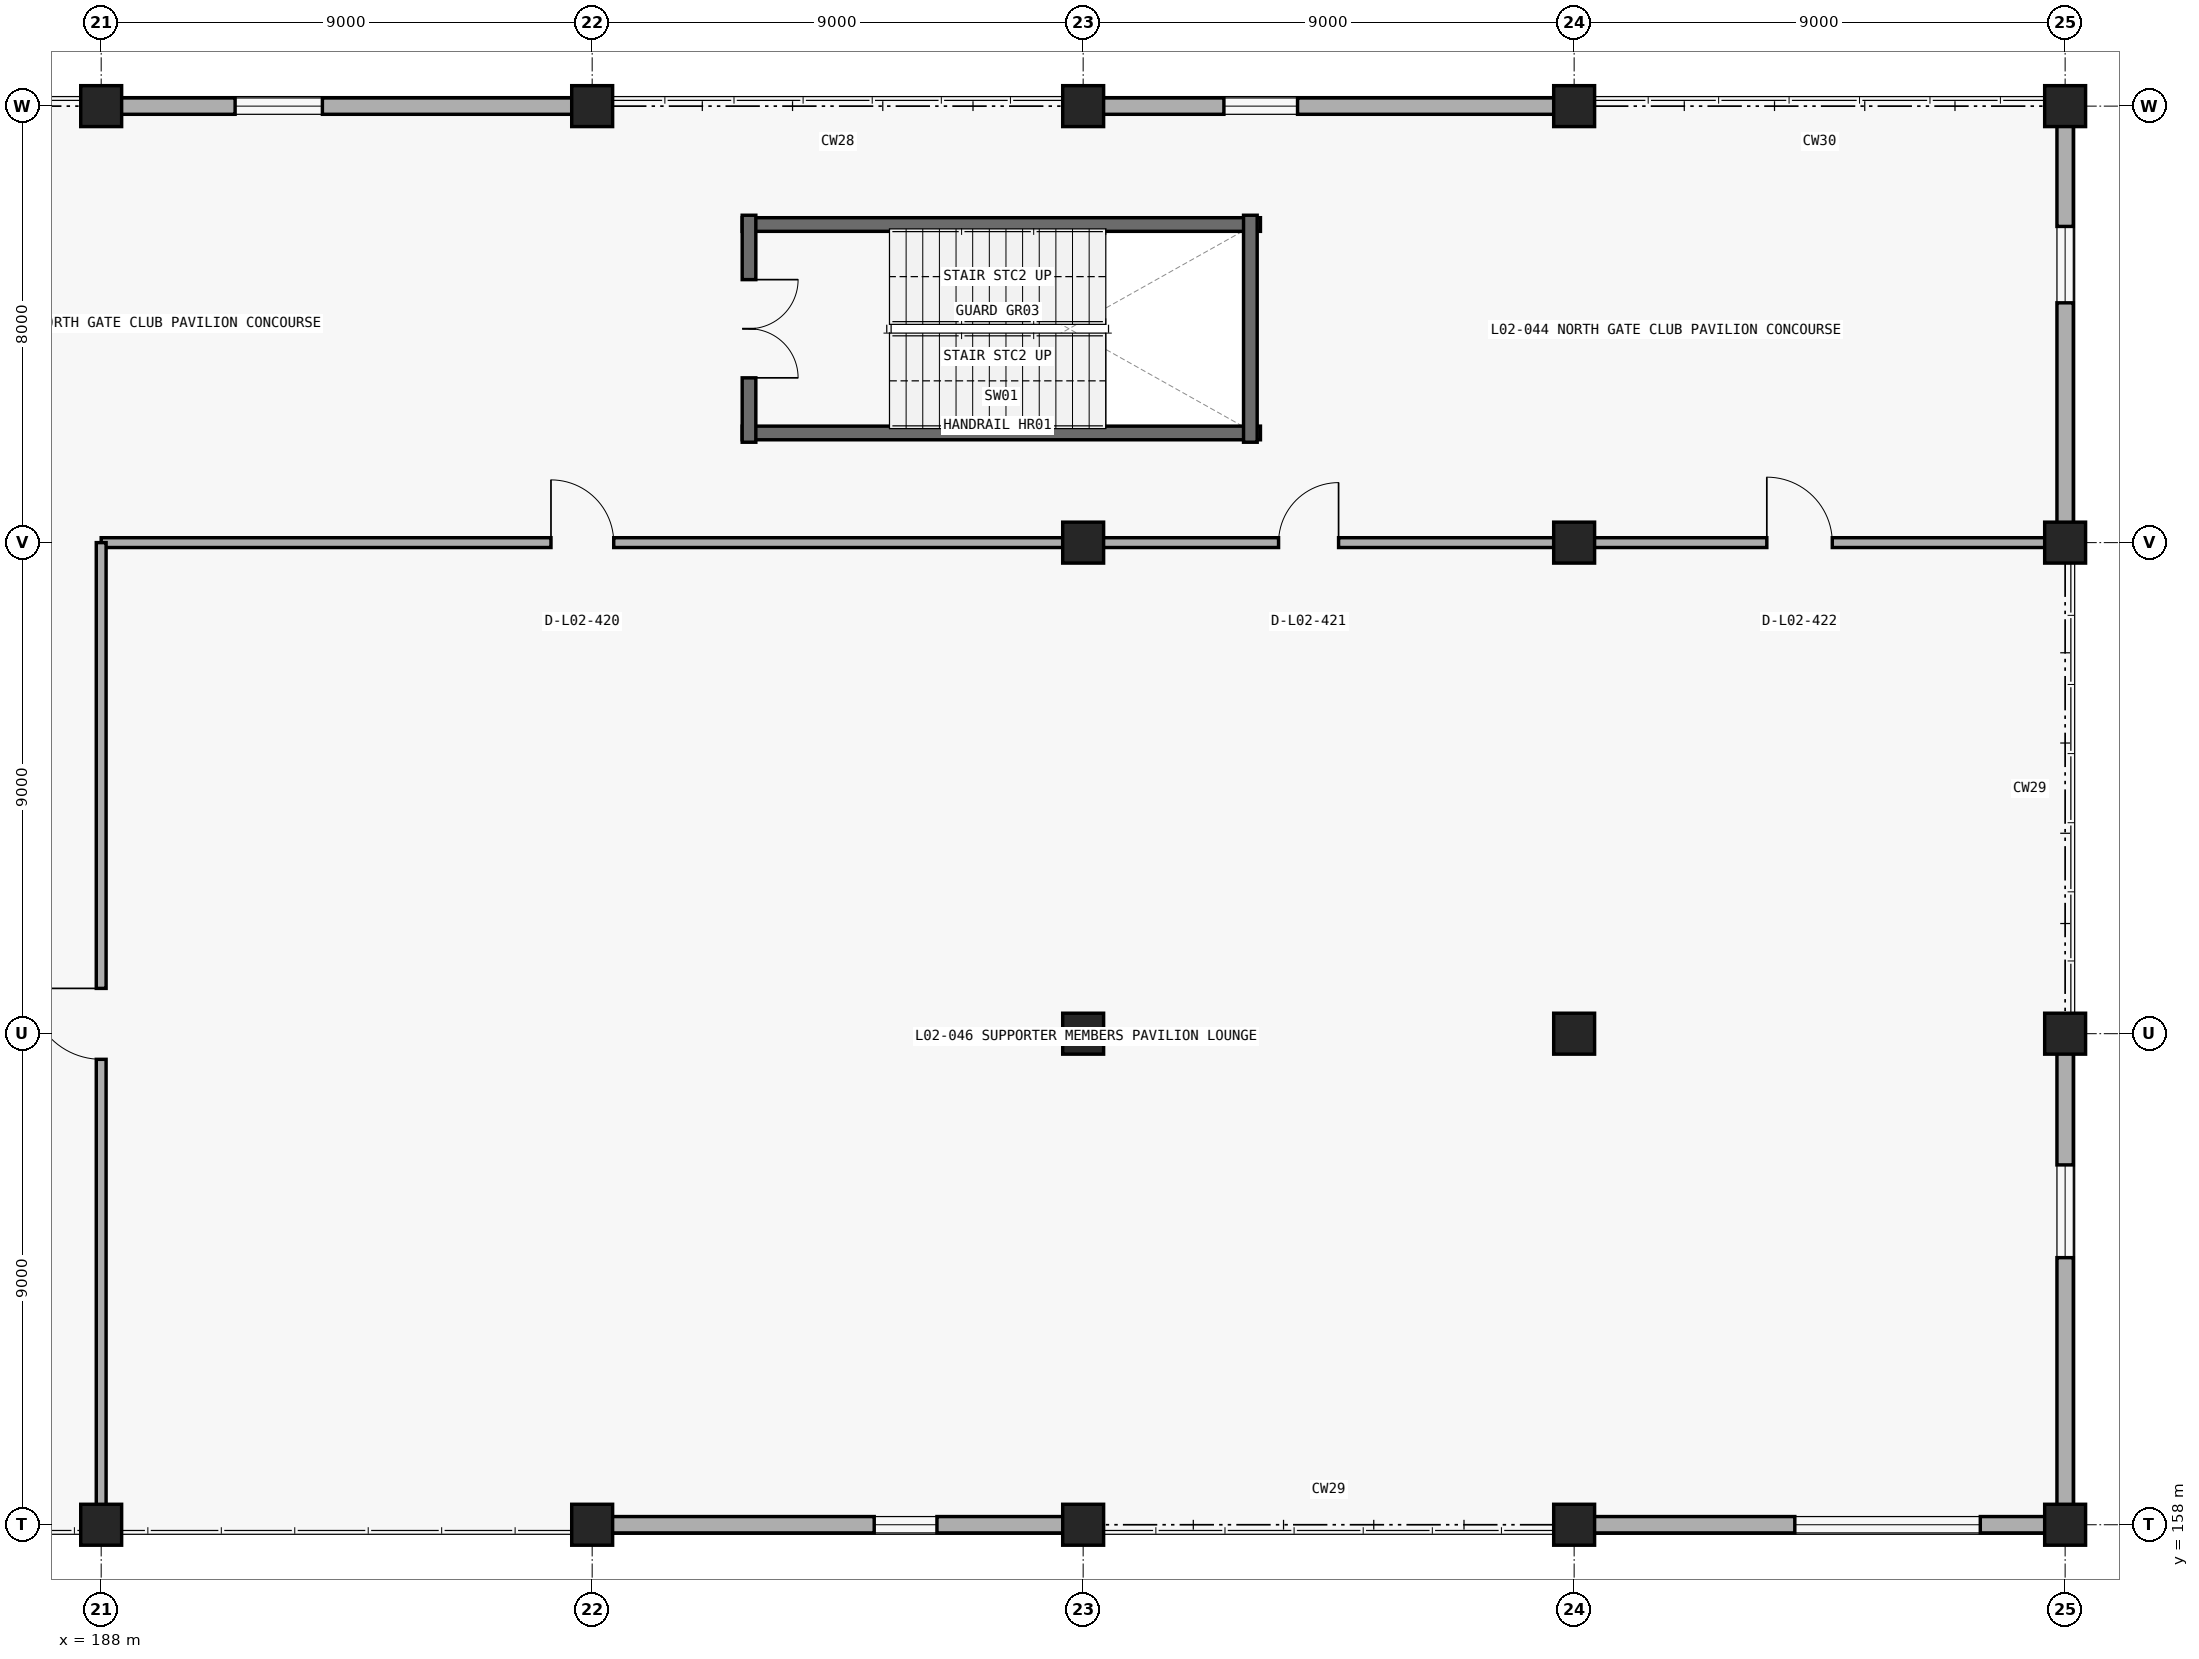
"""IFC4 building model, lengths in metres.
Left out: names, types, materials, properties, quantities, classifications, styles, units other than length and angle.
Written with IfcOpenShell. Run it as: python <this file> out.ifc"""

import sys

from ifc_helpers import new_model, si_unit, direction, frame, frame_2d, origin, origin_2d, place, context, subcontext, project, spatial, rectangle, extrude, element, fill, save


model = new_model("IFC4")
c1 = context("Model", 3, precision=1e-05, world=origin(), true_north=direction((0.0, 1.0)))
c2 = subcontext(c1, "Body", "Model", "MODEL_VIEW")
j1 = project(units=[si_unit("LENGTHUNIT", "METRE"), si_unit("PLANEANGLEUNIT", "RADIAN")], contexts=[c1])
p1 = place(None, origin())
s1 = spatial("IfcSite", under=j1, at=p1, CompositionType="ELEMENT")
p2 = place(p1, origin())
s2 = spatial("IfcBuilding", under=s1, at=p2, CompositionType="ELEMENT")
p3 = place(p2, frame((0.0, 0.0, 10.2)))
s3 = spatial("IfcBuildingStorey", under=s2, at=p3, CompositionType="ELEMENT", Elevation=10.2)
for number, where, z_axis, x_axis in (
    (1, (188.0, 158.0, 0.0), (0.0, 0.0, 1.0), (1.0, 0.0, 0.0)),
    (2, (188.0, 184.0, 0.0), (0.0, 0.0, 1.0), (1.0, 0.0, 0.0)),
    (3, (197.0, 158.0, 0.0), (0.0, 0.0, 1.0), (1.0, 0.0, 0.0)),
    (4, (197.0, 184.0, 0.0), (0.0, 0.0, 1.0), (1.0, 0.0, 0.0)),
    (5, (206.0, 158.0, 0.0), (0.0, 0.0, 1.0), (1.0, 0.0, 0.0)),
    (6, (206.0, 167.0, 0.0), (0.0, 0.0, 1.0), (1.0, 0.0, 0.0)),
    (7, (206.0, 176.0, 0.0), (0.0, 0.0, 1.0), (1.0, 0.0, 0.0)),
    (8, (206.0, 184.0, 0.0), (0.0, 0.0, 1.0), (1.0, 0.0, 0.0)),
    (9, (215.0, 158.0, 0.0), (0.0, 0.0, 1.0), (1.0, 0.0, 0.0)),
    (10, (215.0, 167.0, 0.0), (0.0, 0.0, 1.0), (1.0, 0.0, 0.0)),
    (11, (215.0, 176.0, 0.0), (0.0, 0.0, 1.0), (1.0, 0.0, 0.0)),
    (12, (215.0, 184.0, 0.0), (0.0, 0.0, 1.0), (1.0, 0.0, 0.0)),
    (13, (224.0, 158.0, 0.0), (0.0, 0.0, 1.0), (1.0, 0.0, 0.0)),
    (14, (224.0, 167.0, 0.0), (0.0, 0.0, 1.0), (1.0, 0.0, 0.0)),
    (15, (224.0, 176.0, 0.0), (0.0, 0.0, 1.0), (1.0, 0.0, 0.0)),
    (16, (224.0, 184.0, 0.0), (0.0, 0.0, 1.0), (1.0, 0.0, 0.0)),
):
    element("IfcColumn", number, at=place(p3, frame(where, z_axis=z_axis, x_axis=x_axis)), inside=s3, PredefinedType="COLUMN", context=c2, shape_type="SweptSolid", body=[
        extrude(rectangle(XDim=0.75, YDim=0.75, at=origin_2d()), origin(), (0.0, 0.0, 1.0), 4.8),
    ])
p4 = place(p3, frame((188.35, 184.0, 0.0), z_axis=(0.0, 0.0, 1.0), x_axis=(1.0, 0.0, 0.0)))
e17 = element("IfcWall", 17, at=p4, inside=s3, PredefinedType="STANDARD", context=c2, shape_type="SweptSolid", body=[
    extrude(rectangle(XDim=8.3, YDim=0.3, at=frame_2d((4.15, 0.0))), origin(), (0.0, 0.0, 1.0), 3.855),
])
p5 = place(p4, frame((2.105, 0.0, 0.95)))
e18 = element("IfcOpeningElement", 18, at=p5, cuts=e17, PredefinedType="OPENING", context=c2, shape_type="SweptSolid", body=[
    extrude(rectangle(XDim=1.6, YDim=1.6, at=frame_2d((0.8, 0.8))), frame((0.0, 0.16, 0.0), z_axis=(0.0, -1.0, 0.0), x_axis=(1.0, 0.0, 0.0)), (0.0, 0.0, 1.0), 0.32),
])
p6 = place(p3, frame((206.35, 184.0, 0.0), z_axis=(0.0, 0.0, 1.0), x_axis=(1.0, 0.0, 0.0)))
e19 = element("IfcWall", 19, at=p6, inside=s3, PredefinedType="STANDARD", context=c2, shape_type="SweptSolid", body=[
    extrude(rectangle(XDim=8.3, YDim=0.3, at=frame_2d((4.15, 0.0))), origin(), (0.0, 0.0, 1.0), 3.855),
])
p7 = place(p6, frame((2.23, 0.0, 0.95)))
e20 = element("IfcOpeningElement", 20, at=p7, cuts=e19, PredefinedType="OPENING", context=c2, shape_type="SweptSolid", body=[
    extrude(rectangle(XDim=1.35, YDim=1.9, at=frame_2d((0.675, 0.95))), frame((0.0, 0.16, 0.0), z_axis=(0.0, -1.0, 0.0), x_axis=(1.0, 0.0, 0.0)), (0.0, 0.0, 1.0), 0.32),
])
p8 = place(p3, frame((224.0, 183.65, 0.0), z_axis=(0.0, 0.0, 1.0), x_axis=(0.0, -1.0, 0.0)))
e21 = element("IfcWall", 21, at=p8, inside=s3, PredefinedType="STANDARD", context=c2, shape_type="SweptSolid", body=[
    extrude(rectangle(XDim=7.3, YDim=0.3, at=frame_2d((3.65, 0.0))), origin(), (0.0, 0.0, 1.0), 3.817),
])
p9 = place(p8, frame((1.855, 0.0, 0.95)))
e22 = element("IfcOpeningElement", 22, at=p9, cuts=e21, PredefinedType="OPENING", context=c2, shape_type="SweptSolid", body=[
    extrude(rectangle(XDim=1.4, YDim=1.5, at=frame_2d((0.7, 0.75))), frame((0.0, 0.16, 0.0), z_axis=(0.0, -1.0, 0.0), x_axis=(1.0, 0.0, 0.0)), (0.0, 0.0, 1.0), 0.32),
])
p10 = place(p3, frame((224.0, 166.65, 0.0), z_axis=(0.0, 0.0, 1.0), x_axis=(0.0, -1.0, 0.0)))
e23 = element("IfcWall", 23, at=p10, inside=s3, PredefinedType="STANDARD", context=c2, shape_type="SweptSolid", body=[
    extrude(rectangle(XDim=8.3, YDim=0.3, at=frame_2d((4.15, 0.0))), origin(), (0.0, 0.0, 1.0), 3.817),
])
p11 = place(p10, frame((2.055, 0.0, 0.95)))
e24 = element("IfcOpeningElement", 24, at=p11, cuts=e23, PredefinedType="OPENING", context=c2, shape_type="SweptSolid", body=[
    extrude(rectangle(XDim=1.7, YDim=1.75, at=frame_2d((0.85, 0.875))), frame((0.0, 0.16, 0.0), z_axis=(0.0, -1.0, 0.0), x_axis=(1.0, 0.0, 0.0)), (0.0, 0.0, 1.0), 0.32),
])
p12 = place(p3, frame((223.65, 158.0, 0.0), z_axis=(0.0, 0.0, 1.0), x_axis=(-1.0, 0.0, 0.0)))
e25 = element("IfcWall", 25, at=p12, inside=s3, PredefinedType="STANDARD", context=c2, shape_type="SweptSolid", body=[
    extrude(rectangle(XDim=8.3, YDim=0.3, at=frame_2d((4.15, 0.0))), origin(), (0.0, 0.0, 1.0), 3.855),
])
p13 = place(p12, frame((1.205, 0.0, 0.95)))
e26 = element("IfcOpeningElement", 26, at=p13, cuts=e25, PredefinedType="OPENING", context=c2, shape_type="SweptSolid", body=[
    extrude(rectangle(XDim=3.4, YDim=2.25, at=frame_2d((1.7, 1.125))), frame((0.0, 0.16, 0.0), z_axis=(0.0, -1.0, 0.0), x_axis=(1.0, 0.0, 0.0)), (0.0, 0.0, 1.0), 0.32),
])
p14 = place(p3, frame((205.65, 158.0, 0.0), z_axis=(0.0, 0.0, 1.0), x_axis=(-1.0, 0.0, 0.0)))
e27 = element("IfcWall", 27, at=p14, inside=s3, PredefinedType="STANDARD", context=c2, shape_type="SweptSolid", body=[
    extrude(rectangle(XDim=8.3, YDim=0.3, at=frame_2d((4.15, 0.0))), origin(), (0.0, 0.0, 1.0), 3.855),
])
p15 = place(p14, frame((2.33, 0.0, 0.95)))
e28 = element("IfcOpeningElement", 28, at=p15, cuts=e27, PredefinedType="OPENING", context=c2, shape_type="SweptSolid", body=[
    extrude(rectangle(XDim=1.15, YDim=1.7, at=frame_2d((0.575, 0.85))), frame((0.0, 0.16, 0.0), z_axis=(0.0, -1.0, 0.0), x_axis=(1.0, 0.0, 0.0)), (0.0, 0.0, 1.0), 0.32),
])
for number, where, z_axis, x_axis in (
    (29, (199.75, 178.01, 0.0), (0.0, 0.0, 1.0), (1.0, 0.0, 0.0)),
    (30, (209.25, 181.83, 0.0), (0.0, 0.0, 1.0), (-1.0, 0.0, 0.0)),
):
    element("IfcWall", number, at=place(p3, frame(where, z_axis=z_axis, x_axis=x_axis)), inside=s3, PredefinedType="SHEAR", context=c2, shape_type="SweptSolid", body=[
        extrude(rectangle(XDim=9.5, YDim=0.25, at=frame_2d((4.75, 0.0))), origin(), (0.0, 0.0, 1.0), 4.5),
    ])
p16 = place(p3, frame((199.875, 182.0, 0.0), z_axis=(0.0, 0.0, 1.0), x_axis=(0.0, -1.0, 0.0)))
e31 = element("IfcWall", 31, at=p16, inside=s3, PredefinedType="SHEAR", context=c2, shape_type="SweptSolid", body=[
    extrude(rectangle(XDim=4.16, YDim=0.25, at=frame_2d((2.08, 0.0))), origin(), (0.0, 0.0, 1.0), 4.5),
])
p17 = place(p16, frame((1.18, 0.0, 0.0)))
e32 = element("IfcOpeningElement", 32, at=p17, cuts=e31, PredefinedType="OPENING", context=c2, shape_type="SweptSolid", body=[
    extrude(rectangle(XDim=1.8, YDim=2.25, at=frame_2d((0.9, 1.125))), frame((0.0, 0.135, 0.0), z_axis=(0.0, -1.0, 0.0), x_axis=(1.0, 0.0, 0.0)), (0.0, 0.0, 1.0), 0.27),
])
p18 = place(p3, frame((209.065, 177.84, 0.0), z_axis=(0.0, 0.0, 1.0), x_axis=(0.0, 1.0, 0.0)))
e33 = element("IfcWall", 33, at=p18, inside=s3, PredefinedType="SHEAR", context=c2, shape_type="SweptSolid", body=[
    extrude(rectangle(XDim=4.16, YDim=0.25, at=frame_2d((2.08, 0.0))), origin(), (0.0, 0.0, 1.0), 4.5),
])
p19 = place(p3, frame((188.0, 176.0, 0.0), z_axis=(0.0, 0.0, 1.0), x_axis=(1.0, 0.0, 0.0)))
e34 = element("IfcWall", 34, at=p19, inside=s3, PredefinedType="PARTITIONING", context=c2, shape_type="SweptSolid", body=[
    extrude(rectangle(XDim=17.64, YDim=0.18, at=frame_2d((8.82, 0.0))), origin(), (0.0, 0.0, 1.0), 4.48),
])
p20 = place(p19, frame((8.245, 0.0, 0.0)))
e35 = element("IfcOpeningElement", 35, at=p20, cuts=e34, PredefinedType="OPENING", context=c2, shape_type="SweptSolid", body=[
    extrude(rectangle(XDim=1.15, YDim=2.2, at=frame_2d((0.575, 1.1))), frame((0.0, 0.1, 0.0), z_axis=(0.0, -1.0, 0.0), x_axis=(1.0, 0.0, 0.0)), (0.0, 0.0, 1.0), 0.2),
])
p21 = place(p3, frame((205.625, 176.0, 0.0), z_axis=(0.0, 0.0, 1.0), x_axis=(1.0, 0.0, 0.0)))
e36 = element("IfcWall", 36, at=p21, inside=s3, PredefinedType="PARTITIONING", context=c2, shape_type="SweptSolid", body=[
    extrude(rectangle(XDim=9.015, YDim=0.18, at=frame_2d((4.507, 0.0))), origin(), (0.0, 0.0, 1.0), 3.855),
])
p22 = place(p21, frame((3.957, 0.0, 0.0)))
e37 = element("IfcOpeningElement", 37, at=p22, cuts=e36, PredefinedType="OPENING", context=c2, shape_type="SweptSolid", body=[
    extrude(rectangle(XDim=1.1, YDim=2.15, at=frame_2d((0.55, 1.075))), frame((0.0, 0.1, 0.0), z_axis=(0.0, -1.0, 0.0), x_axis=(1.0, 0.0, 0.0)), (0.0, 0.0, 1.0), 0.2),
])
p23 = place(p3, frame((214.625, 176.0, 0.0), z_axis=(0.0, 0.0, 1.0), x_axis=(1.0, 0.0, 0.0)))
e38 = element("IfcWall", 38, at=p23, inside=s3, PredefinedType="PARTITIONING", context=c2, shape_type="SweptSolid", body=[
    extrude(rectangle(XDim=9.015, YDim=0.18, at=frame_2d((4.507, 0.0))), origin(), (0.0, 0.0, 1.0), 3.855),
])
p24 = place(p23, frame((3.907, 0.0, 0.0)))
e39 = element("IfcOpeningElement", 39, at=p24, cuts=e38, PredefinedType="OPENING", context=c2, shape_type="SweptSolid", body=[
    extrude(rectangle(XDim=1.2, YDim=2.25, at=frame_2d((0.6, 1.125))), frame((0.0, 0.1, 0.0), z_axis=(0.0, -1.0, 0.0), x_axis=(1.0, 0.0, 0.0)), (0.0, 0.0, 1.0), 0.2),
])
p25 = place(p3, frame((188.0, 158.36, 0.0), z_axis=(0.0, 0.0, 1.0), x_axis=(0.0, 1.0, 0.0)))
e40 = element("IfcWall", 40, at=p25, inside=s3, PredefinedType="PARTITIONING", context=c2, shape_type="SweptSolid", body=[
    extrude(rectangle(XDim=17.64, YDim=0.18, at=frame_2d((8.82, 0.0))), origin(), (0.0, 0.0, 1.0), 4.48),
])
p26 = place(p25, frame((8.17, 0.0, 0.0)))
e41 = element("IfcOpeningElement", 41, at=p26, cuts=e40, PredefinedType="OPENING", context=c2, shape_type="SweptSolid", body=[
    extrude(rectangle(XDim=1.3, YDim=2.25, at=frame_2d((0.65, 1.125))), frame((0.0, 0.1, 0.0), z_axis=(0.0, -1.0, 0.0), x_axis=(1.0, 0.0, 0.0)), (0.0, 0.0, 1.0), 0.2),
])
p27 = place(p5, origin())
e42 = element("IfcWindow", 42, at=p27, inside=s3, PartitioningType="SINGLE_PANEL", PredefinedType="WINDOW", context=c2, shape_type="SweptSolid", body=[
    extrude(rectangle(XDim=1.6, YDim=1.6, at=frame_2d((0.8, 0.8))), frame((0.0, 0.03, 0.0), z_axis=(0.0, -1.0, 0.0), x_axis=(1.0, 0.0, 0.0)), (0.0, 0.0, 1.0), 0.06),
])
fill(e18, e42)
p28 = place(p7, origin())
e43 = element("IfcWindow", 43, at=p28, inside=s3, PartitioningType="SINGLE_PANEL", PredefinedType="WINDOW", context=c2, shape_type="SweptSolid", body=[
    extrude(rectangle(XDim=1.35, YDim=1.9, at=frame_2d((0.675, 0.95))), frame((0.0, 0.03, 0.0), z_axis=(0.0, -1.0, 0.0), x_axis=(1.0, 0.0, 0.0)), (0.0, 0.0, 1.0), 0.06),
])
fill(e20, e43)
p29 = place(p9, origin())
e44 = element("IfcWindow", 44, at=p29, inside=s3, PartitioningType="SINGLE_PANEL", PredefinedType="WINDOW", context=c2, shape_type="SweptSolid", body=[
    extrude(rectangle(XDim=1.4, YDim=1.5, at=frame_2d((0.7, 0.75))), frame((0.0, 0.03, 0.0), z_axis=(0.0, -1.0, 0.0), x_axis=(1.0, 0.0, 0.0)), (0.0, 0.0, 1.0), 0.06),
])
fill(e22, e44)
p30 = place(p11, origin())
e45 = element("IfcWindow", 45, at=p30, inside=s3, PartitioningType="SINGLE_PANEL", PredefinedType="WINDOW", context=c2, shape_type="SweptSolid", body=[
    extrude(rectangle(XDim=1.7, YDim=1.75, at=frame_2d((0.85, 0.875))), frame((0.0, 0.03, 0.0), z_axis=(0.0, -1.0, 0.0), x_axis=(1.0, 0.0, 0.0)), (0.0, 0.0, 1.0), 0.06),
])
fill(e24, e45)
p31 = place(p13, origin())
e46 = element("IfcWindow", 46, at=p31, inside=s3, PartitioningType="SINGLE_PANEL", PredefinedType="WINDOW", context=c2, shape_type="SweptSolid", body=[
    extrude(rectangle(XDim=3.4, YDim=2.25, at=frame_2d((1.7, 1.125))), frame((0.0, 0.03, 0.0), z_axis=(0.0, -1.0, 0.0), x_axis=(1.0, 0.0, 0.0)), (0.0, 0.0, 1.0), 0.06),
])
fill(e26, e46)
p32 = place(p15, origin())
e47 = element("IfcWindow", 47, at=p32, inside=s3, PartitioningType="SINGLE_PANEL", PredefinedType="WINDOW", context=c2, shape_type="SweptSolid", body=[
    extrude(rectangle(XDim=1.15, YDim=1.7, at=frame_2d((0.575, 0.85))), frame((0.0, 0.03, 0.0), z_axis=(0.0, -1.0, 0.0), x_axis=(1.0, 0.0, 0.0)), (0.0, 0.0, 1.0), 0.06),
])
fill(e28, e47)
p33 = place(p17, origin())
e48 = element("IfcDoor", 48, at=p33, inside=s3, OperationType="DOUBLE_DOOR_SINGLE_SWING", PredefinedType="DOOR", context=c2, shape_type="SweptSolid", body=[
    extrude(rectangle(XDim=1.8, YDim=2.25, at=frame_2d((0.9, 1.125))), frame((0.0, 0.025, 0.0), z_axis=(0.0, -1.0, 0.0), x_axis=(1.0, 0.0, 0.0)), (0.0, 0.0, 1.0), 0.05),
])
fill(e32, e48)
p34 = place(p20, origin())
e49 = element("IfcDoor", 49, at=p34, inside=s3, OperationType="SINGLE_SWING_LEFT", PredefinedType="DOOR", context=c2, shape_type="SweptSolid", body=[
    extrude(rectangle(XDim=1.15, YDim=2.2, at=frame_2d((0.575, 1.1))), frame((0.0, 0.025, 0.0), z_axis=(0.0, -1.0, 0.0), x_axis=(1.0, 0.0, 0.0)), (0.0, 0.0, 1.0), 0.05),
])
fill(e35, e49)
p35 = place(p22, origin())
e50 = element("IfcDoor", 50, at=p35, inside=s3, OperationType="SINGLE_SWING_RIGHT", PredefinedType="DOOR", context=c2, shape_type="SweptSolid", body=[
    extrude(rectangle(XDim=1.1, YDim=2.15, at=frame_2d((0.55, 1.075))), frame((0.0, 0.025, 0.0), z_axis=(0.0, -1.0, 0.0), x_axis=(1.0, 0.0, 0.0)), (0.0, 0.0, 1.0), 0.05),
])
fill(e37, e50)
p36 = place(p24, origin())
e51 = element("IfcDoor", 51, at=p36, inside=s3, OperationType="SINGLE_SWING_LEFT", PredefinedType="DOOR", context=c2, shape_type="SweptSolid", body=[
    extrude(rectangle(XDim=1.2, YDim=2.25, at=frame_2d((0.6, 1.125))), frame((0.0, 0.025, 0.0), z_axis=(0.0, -1.0, 0.0), x_axis=(1.0, 0.0, 0.0)), (0.0, 0.0, 1.0), 0.05),
])
fill(e39, e51)
p37 = place(p26, origin())
e52 = element("IfcDoor", 52, at=p37, inside=s3, OperationType="SINGLE_SWING_RIGHT", PredefinedType="DOOR", context=c2, shape_type="SweptSolid", body=[
    extrude(rectangle(XDim=1.3, YDim=2.25, at=frame_2d((0.65, 1.125))), frame((0.0, 0.025, 0.0), z_axis=(0.0, -1.0, 0.0), x_axis=(1.0, 0.0, 0.0)), (0.0, 0.0, 1.0), 0.05),
])
fill(e41, e52)
save(model, sys.argv[1])
